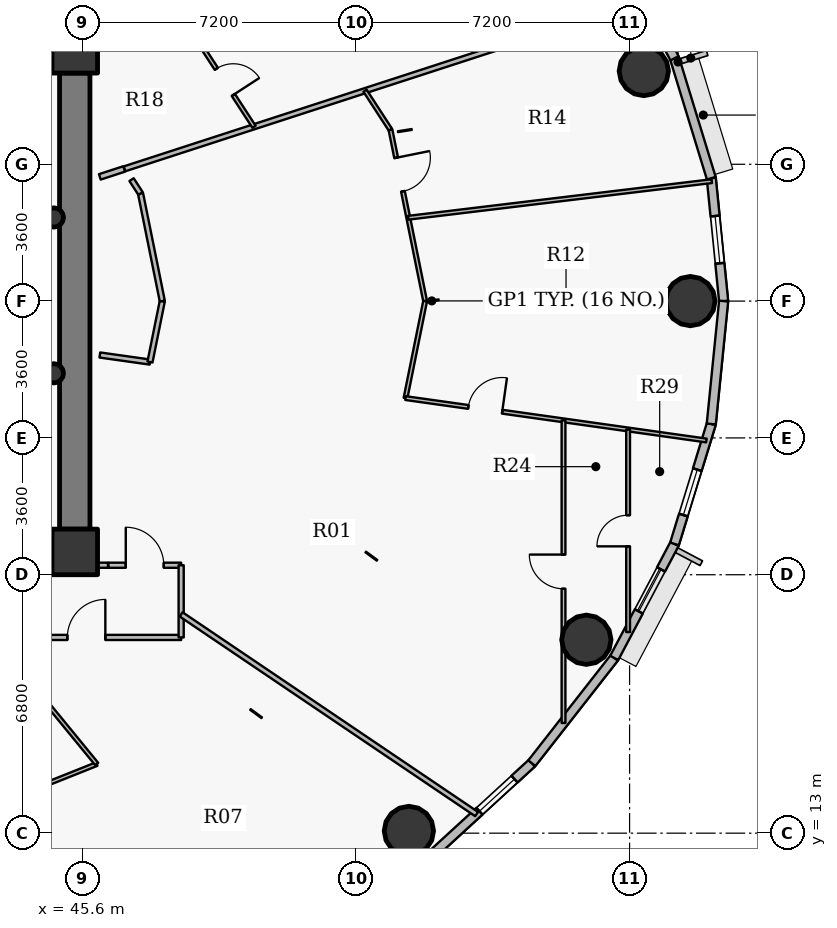
"""IFC4 building model, lengths in metres.
Left out: names, types, materials, properties, quantities, classifications, styles, units other than length and angle.
Written with IfcOpenShell. Run it as: python <this file> out.ifc"""

import sys

from ifc_helpers import new_model, si_unit, direction, frame, frame_2d, origin, origin_2d, place, context, subcontext, project, spatial, rectangle, hollow_circle, extrude, source, transform, mapped, element, fill, save


model = new_model("IFC4")
c1 = context("Model", 3, precision=1e-05, world=origin(), true_north=direction((0.0, 1.0)))
c2 = subcontext(c1, "Body", "Model", "MODEL_VIEW")
j1 = project(units=[si_unit("LENGTHUNIT", "METRE"), si_unit("PLANEANGLEUNIT", "RADIAN")], contexts=[c1])
p1 = place(None, origin())
s1 = spatial("IfcSite", under=j1, at=p1, CompositionType="ELEMENT")
p2 = place(p1, origin())
s2 = spatial("IfcBuilding", under=s1, at=p2, CompositionType="ELEMENT")
p3 = place(p2, frame((0.0, 0.0, 156.15)))
s3 = spatial("IfcBuildingStorey", under=s2, at=p3, CompositionType="ELEMENT", Elevation=156.15)
for number, where, z_axis, x_axis in (
    (1, (45.4, 20.4, 0.0), (0.0, 0.0, 1.0), (1.0, 0.0, 0.0)),
    (2, (45.4, 33.6, 0.0), (0.0, 0.0, 1.0), (1.0, 0.0, 0.0)),
):
    element("IfcColumn", number, at=place(p3, frame(where, z_axis=z_axis, x_axis=x_axis)), inside=s3, PredefinedType="COLUMN", context=c2, shape_type="SweptSolid", body=[
        extrude(rectangle(XDim=1.2, YDim=1.2, at=origin_2d()), origin(), (0.0, 0.0, 1.0), 3.75),
    ])
p4 = place(p3, frame((45.4, 33.0, 0.0), z_axis=(0.0, 0.0, 1.0), x_axis=(0.0, -1.0, 0.0)))
e3 = element("IfcWall", 3, at=p4, inside=s3, PredefinedType="SHEAR", context=c2, shape_type="SweptSolid", body=[
    extrude(rectangle(XDim=12.0, YDim=0.8, at=frame_2d((6.0, 0.0))), origin(), (0.0, 0.0, 1.0), 2.95),
])
for number, where, z_axis, x_axis in (
    (4, (61.6, 27.0, 0.0), (0.0, 0.0, 1.0), (1.0, 0.0, 0.0)),
    (5, (60.375, 33.053, 0.0), (0.0, 0.0, 1.0), (1.0, 0.0, 0.0)),
    (6, (54.192, 13.058, 0.0), (0.0, 0.0, 1.0), (1.0, 0.0, 0.0)),
    (7, (58.863, 18.089, 0.0), (0.0, 0.0, 1.0), (1.0, 0.0, 0.0)),
):
    element("IfcColumn", number, at=place(p3, frame(where, z_axis=z_axis, x_axis=x_axis)), inside=s3, PredefinedType="COLUMN", context=c2, shape_type="SweptSolid", body=[
        extrude(hollow_circle(Radius=0.65, WallThickness=0.04, at=origin_2d()), origin(), (0.0, 0.0, 1.0), 3.75),
    ])
for number, where, z_axis, x_axis in (
    (8, (44.85, 25.1, 0.0), (0.0, 0.0, 1.0), (1.0, 0.0, 0.0)),
    (9, (44.85, 29.2, 0.0), (0.0, 0.0, 1.0), (1.0, 0.0, 0.0)),
):
    element("IfcColumn", number, at=place(p3, frame(where, z_axis=z_axis, x_axis=x_axis)), inside=s3, PredefinedType="COLUMN", context=c2, shape_type="SweptSolid", body=[
        extrude(hollow_circle(Radius=0.254, WallThickness=0.02, at=origin_2d()), origin(), (0.0, 0.0, 1.0), 3.75),
    ])
p5 = place(p3, frame((62.15, 30.234, 0.0), z_axis=(0.0, 0.0, 1.0), x_axis=(0.100061534614, -0.994981250723, 0.0)))
e10 = element("IfcWall", 10, at=p5, inside=s3, PredefinedType="SOLIDWALL", context=c2, shape_type="SweptSolid", body=[
    extrude(rectangle(XDim=3.25, YDim=0.24, at=frame_2d((1.625, 0.0))), origin(), (0.0, 0.0, 1.0), 3.5),
])
p6 = place(p5, frame((1.0, 0.0, 0.9)))
e11 = element("IfcOpeningElement", 11, at=p6, cuts=e10, PredefinedType="OPENING", context=c2, shape_type="SweptSolid", body=[
    extrude(rectangle(XDim=1.25, YDim=1.65, at=origin_2d()), frame((0.625, 0.13, 0.825), z_axis=(0.0, -1.0, 0.0), x_axis=(1.0, 0.0, 0.0)), (0.0, 0.0, 1.0), 0.26),
])
p7 = place(p3, frame((61.183, 33.389, 0.0), z_axis=(0.0, 0.0, 1.0), x_axis=(0.293097995113, -0.956082405058, 0.0)))
e12 = element("IfcWall", 12, at=p7, inside=s3, PredefinedType="SOLIDWALL", context=c2, shape_type="SweptSolid", body=[
    extrude(rectangle(XDim=3.3, YDim=0.24, at=frame_2d((1.65, 0.0))), origin(), (0.0, 0.0, 1.0), 3.5),
])
p8 = place(p3, frame((59.596, 36.388, 0.0), z_axis=(0.0, 0.0, 1.0), x_axis=(0.467586874938, -0.88394712194, 0.0)))
e13 = element("IfcWall", 13, at=p8, inside=s3, PredefinedType="SOLIDWALL", context=c2, shape_type="SweptSolid", body=[
    extrude(rectangle(XDim=3.393, YDim=0.24, at=frame_2d((1.697, 0.0))), origin(), (0.0, 0.0, 1.0), 3.5),
])
p9 = place(p3, frame((57.428, 14.842, 0.0), z_axis=(0.0, 0.0, 1.0), x_axis=(-0.737076565834, -0.675809245349, 0.0)))
e14 = element("IfcWall", 14, at=p9, inside=s3, PredefinedType="SOLIDWALL", context=c2, shape_type="SweptSolid", body=[
    extrude(rectangle(XDim=3.658, YDim=0.24, at=frame_2d((1.829, 0.0))), origin(), (0.0, 0.0, 1.0), 3.5),
])
p10 = place(p9, frame((0.621, 0.0, 0.9)))
e15 = element("IfcOpeningElement", 15, at=p10, cuts=e14, PredefinedType="OPENING", context=c2, shape_type="SweptSolid", body=[
    extrude(rectangle(XDim=1.25, YDim=1.65, at=origin_2d()), frame((0.625, 0.13, 0.825), z_axis=(0.0, -1.0, 0.0), x_axis=(1.0, 0.0, 0.0)), (0.0, 0.0, 1.0), 0.26),
])
p11 = place(p3, frame((59.596, 17.612, 0.0), z_axis=(0.0, 0.0, 1.0), x_axis=(-0.616287674549, -0.787521112224, 0.0)))
e16 = element("IfcWall", 16, at=p11, inside=s3, PredefinedType="SOLIDWALL", context=c2, shape_type="SweptSolid", body=[
    extrude(rectangle(XDim=3.517, YDim=0.24, at=frame_2d((1.759, 0.0))), origin(), (0.0, 0.0, 1.0), 3.5),
])
p12 = place(p3, frame((61.183, 20.611, 0.0), z_axis=(0.0, 0.0, 1.0), x_axis=(-0.467586874938, -0.88394712194, 0.0)))
e17 = element("IfcWall", 17, at=p12, inside=s3, PredefinedType="SOLIDWALL", context=c2, shape_type="SweptSolid", body=[
    extrude(rectangle(XDim=3.393, YDim=0.24, at=frame_2d((1.697, 0.0))), origin(), (0.0, 0.0, 1.0), 3.5),
])
p13 = place(p12, frame((0.759, 0.0, 0.9)))
e18 = element("IfcOpeningElement", 18, at=p13, cuts=e17, PredefinedType="OPENING", context=c2, shape_type="SweptSolid", body=[
    extrude(rectangle(XDim=1.25, YDim=1.65, at=origin_2d()), frame((0.625, 0.13, 0.825), z_axis=(0.0, -1.0, 0.0), x_axis=(1.0, 0.0, 0.0)), (0.0, 0.0, 1.0), 0.26),
])
p14 = place(p3, frame((62.15, 23.766, 0.0), z_axis=(0.0, 0.0, 1.0), x_axis=(-0.293097995113, -0.956082405058, 0.0)))
e19 = element("IfcWall", 19, at=p14, inside=s3, PredefinedType="SOLIDWALL", context=c2, shape_type="SweptSolid", body=[
    extrude(rectangle(XDim=3.3, YDim=0.24, at=frame_2d((1.65, 0.0))), origin(), (0.0, 0.0, 1.0), 3.5),
])
p15 = place(p14, frame((1.256, 0.0, 0.9)))
e20 = element("IfcOpeningElement", 20, at=p15, cuts=e19, PredefinedType="OPENING", context=c2, shape_type="SweptSolid", body=[
    extrude(rectangle(XDim=1.25, YDim=1.65, at=origin_2d()), frame((0.625, 0.13, 0.825), z_axis=(0.0, -1.0, 0.0), x_axis=(1.0, 0.0, 0.0)), (0.0, 0.0, 1.0), 0.26),
])
p16 = place(p3, frame((62.475, 27.0, 0.0), z_axis=(0.0, 0.0, 1.0), x_axis=(-0.100061534614, -0.994981250723, 0.0)))
e21 = element("IfcWall", 21, at=p16, inside=s3, PredefinedType="SOLIDWALL", context=c2, shape_type="SweptSolid", body=[
    extrude(rectangle(XDim=3.25, YDim=0.24, at=frame_2d((1.625, 0.0))), origin(), (0.0, 0.0, 1.0), 3.5),
])
p17 = place(p3, frame((35.486, 18.15, 0.0), z_axis=(0.0, 0.0, 1.0), x_axis=(1.0, 0.0, 0.0)))
e22 = element("IfcWall", 22, at=p17, inside=s3, PredefinedType="PARTITIONING", context=c2, shape_type="SweptSolid", body=[
    extrude(rectangle(XDim=12.714, YDim=0.135, at=frame_2d((6.357, 0.0))), origin(), (0.0, 0.0, 1.0), 2.935),
])
p18 = place(p17, frame((1.628, 0.0, 0.0)))
e23 = element("IfcOpeningElement", 23, at=p18, cuts=e22, PredefinedType="OPENING", context=c2, shape_type="SweptSolid", body=[
    extrude(rectangle(XDim=1.0, YDim=2.15, at=origin_2d()), frame((0.5, 0.078, 1.075), z_axis=(0.0, -1.0, 0.0), x_axis=(1.0, 0.0, 0.0)), (0.0, 0.0, 1.0), 0.155),
])
p19 = place(p17, frame((9.719, 0.0, 0.0)))
e24 = element("IfcOpeningElement", 24, at=p19, cuts=e22, PredefinedType="OPENING", context=c2, shape_type="SweptSolid", body=[
    extrude(rectangle(XDim=1.0, YDim=2.15, at=origin_2d()), frame((0.5, 0.078, 1.075), z_axis=(0.0, -1.0, 0.0), x_axis=(1.0, 0.0, 0.0)), (0.0, 0.0, 1.0), 0.155),
])
p20 = place(p3, frame((41.794, 13.149, 0.0), z_axis=(0.0, 0.0, 1.0), x_axis=(0.928797683311, 0.370587187415, 0.0)))
e25 = element("IfcWall", 25, at=p20, inside=s3, PredefinedType="PARTITIONING", context=c2, shape_type="SweptSolid", body=[
    extrude(rectangle(XDim=4.506, YDim=0.1, at=frame_2d((2.253, 0.0))), origin(), (0.0, 0.0, 1.0), 2.935),
])
p21 = place(p20, frame((1.803, 0.0, 0.0)))
e26 = element("IfcOpeningElement", 26, at=p21, cuts=e25, PredefinedType="OPENING", context=c2, shape_type="SweptSolid", body=[
    extrude(rectangle(XDim=0.9, YDim=2.1, at=origin_2d()), frame((0.45, 0.06, 1.05), z_axis=(0.0, -1.0, 0.0), x_axis=(1.0, 0.0, 0.0)), (0.0, 0.0, 1.0), 0.12),
])
p22 = place(p3, frame((43.25, 18.15, 0.0), z_axis=(0.0, 0.0, 1.0), x_axis=(0.633743940899, -0.773542899505, 0.0)))
e27 = element("IfcWall", 27, at=p22, inside=s3, PredefinedType="PARTITIONING", context=c2, shape_type="SweptSolid", body=[
    extrude(rectangle(XDim=4.307, YDim=0.1, at=frame_2d((2.153, 0.0))), origin(), (0.0, 0.0, 1.0), 3.5),
])
p23 = place(p22, frame((0.414, 0.0, 0.0)))
e28 = element("IfcOpeningElement", 28, at=p23, cuts=e27, PredefinedType="OPENING", context=c2, shape_type="SweptSolid", body=[
    extrude(rectangle(XDim=0.82, YDim=2.1, at=origin_2d()), frame((0.41, 0.06, 1.05), z_axis=(0.0, -1.0, 0.0), x_axis=(1.0, 0.0, 0.0)), (0.0, 0.0, 1.0), 0.12),
])
p24 = place(p3, frame((46.285, 20.05, 0.0), z_axis=(0.0, 0.0, 1.0), x_axis=(1.0, 0.0, 0.0)))
e29 = element("IfcWall", 29, at=p24, inside=s3, PredefinedType="PARTITIONING", context=c2, shape_type="SweptSolid", body=[
    extrude(rectangle(XDim=1.915, YDim=0.135, at=frame_2d((0.958, 0.0))), origin(), (0.0, 0.0, 1.0), 3.5),
])
p25 = place(p24, frame((0.458, 0.0, 0.0)))
e30 = element("IfcOpeningElement", 30, at=p25, cuts=e29, PredefinedType="OPENING", context=c2, shape_type="SweptSolid", body=[
    extrude(rectangle(XDim=1.0, YDim=2.15, at=origin_2d()), frame((0.5, 0.078, 1.075), z_axis=(0.0, -1.0, 0.0), x_axis=(1.0, 0.0, 0.0)), (0.0, 0.0, 1.0), 0.155),
])
p26 = place(p3, frame((46.71, 30.48, 0.0), z_axis=(0.0, 0.0, 1.0), x_axis=(0.951054665008, 0.309022691992, 0.0)))
e31 = element("IfcWall", 31, at=p26, inside=s3, PredefinedType="PARTITIONING", context=c2, shape_type="SweptSolid", body=[
    extrude(rectangle(XDim=14.372, YDim=0.135, at=frame_2d((7.186, 0.0))), origin(), (0.0, 0.0, 1.0), 2.935),
])
p27 = place(p3, frame((48.2, 18.15, 0.0), z_axis=(0.0, 0.0, 1.0), x_axis=(0.0, 1.0, 0.0)))
e32 = element("IfcWall", 32, at=p27, inside=s3, PredefinedType="PARTITIONING", context=c2, shape_type="SweptSolid", body=[
    extrude(rectangle(XDim=1.9, YDim=0.135, at=frame_2d((0.95, 0.0))), origin(), (0.0, 0.0, 1.0), 3.5),
])
p28 = place(p3, frame((48.2, 18.756, 0.0), z_axis=(0.0, 0.0, 1.0), x_axis=(0.828559609568, -0.559900860325, 0.0)))
e33 = element("IfcWall", 33, at=p28, inside=s3, PredefinedType="PARTITIONING", context=c2, shape_type="SweptSolid", body=[
    extrude(rectangle(XDim=9.384, YDim=0.135, at=frame_2d((4.692, 0.0))), origin(), (0.0, 0.0, 1.0), 2.935),
])
p29 = place(p3, frame((48.58, 33.95, 0.0), z_axis=(0.0, 0.0, 1.0), x_axis=(0.545393120499, -0.838180376836, 0.0)))
e34 = element("IfcWall", 34, at=p29, inside=s3, PredefinedType="PARTITIONING", context=c2, shape_type="SweptSolid", body=[
    extrude(rectangle(XDim=2.819, YDim=0.1, at=frame_2d((1.41, 0.0))), origin(), (0.0, 0.0, 1.0), 3.5),
])
p30 = place(p29, frame((1.0, 0.0, 0.0)))
e35 = element("IfcOpeningElement", 35, at=p30, cuts=e34, PredefinedType="OPENING", context=c2, shape_type="SweptSolid", body=[
    extrude(rectangle(XDim=0.82, YDim=2.1, at=origin_2d()), frame((0.41, 0.06, 1.05), z_axis=(0.0, -1.0, 0.0), x_axis=(1.0, 0.0, 0.0)), (0.0, 0.0, 1.0), 0.12),
])
p31 = place(p3, frame((53.038, 32.536, 0.0), z_axis=(0.0, 0.0, 1.0), x_axis=(0.545407162254, -0.83817123988, 0.0)))
e36 = element("IfcWall", 36, at=p31, inside=s3, PredefinedType="PARTITIONING", context=c2, shape_type="SweptSolid", body=[
    extrude(rectangle(XDim=1.229, YDim=0.1, at=frame_2d((0.615, 0.0))), origin(), (0.0, 0.0, 1.0), 2.935),
])
p32 = place(p3, frame((53.709, 31.506, 0.0), z_axis=(0.0, 0.0, 1.0), x_axis=(0.198209478932, -0.980159682124, 0.0)))
e37 = element("IfcWall", 37, at=p32, inside=s3, PredefinedType="PARTITIONING", context=c2, shape_type="SweptSolid", body=[
    extrude(rectangle(XDim=4.597, YDim=0.1, at=frame_2d((2.298, 0.0))), origin(), (0.0, 0.0, 1.0), 2.935),
])
p33 = place(p32, frame((0.75, 0.0, 0.0)))
e38 = element("IfcOpeningElement", 38, at=p33, cuts=e37, PredefinedType="OPENING", context=c2, shape_type="SweptSolid", body=[
    extrude(rectangle(XDim=0.9, YDim=2.1, at=origin_2d()), frame((0.45, 0.06, 1.05), z_axis=(0.0, -1.0, 0.0), x_axis=(1.0, 0.0, 0.0)), (0.0, 0.0, 1.0), 0.12),
])
p34 = place(p3, frame((54.104, 24.448, 0.0), z_axis=(0.0, 0.0, 1.0), x_axis=(0.198315541218, 0.980138228063, 0.0)))
e39 = element("IfcWall", 39, at=p34, inside=s3, PredefinedType="PARTITIONING", context=c2, shape_type="SweptSolid", body=[
    extrude(rectangle(XDim=2.604, YDim=0.1, at=frame_2d((1.302, 0.0))), origin(), (0.0, 0.0, 1.0), 2.935),
])
p35 = place(p3, frame((54.104, 24.448, 0.0), z_axis=(0.0, 0.0, 1.0), x_axis=(0.990209750791, -0.139587425789, 0.0)))
e40 = element("IfcWall", 40, at=p35, inside=s3, PredefinedType="PARTITIONING", context=c2, shape_type="SweptSolid", body=[
    extrude(rectangle(XDim=7.997, YDim=0.1, at=frame_2d((3.998, 0.0))), origin(), (0.0, 0.0, 1.0), 2.935),
])
p36 = place(p35, frame((1.67, 0.0, 0.0)))
e41 = element("IfcOpeningElement", 41, at=p36, cuts=e40, PredefinedType="OPENING", context=c2, shape_type="SweptSolid", body=[
    extrude(rectangle(XDim=0.9, YDim=2.1, at=origin_2d()), frame((0.45, 0.06, 1.05), z_axis=(0.0, -1.0, 0.0), x_axis=(1.0, 0.0, 0.0)), (0.0, 0.0, 1.0), 0.12),
])
p37 = place(p3, frame((54.177, 29.193, 0.0), z_axis=(0.0, 0.0, 1.0), x_axis=(0.992799222866, 0.119790246168, 0.0)))
e42 = element("IfcWall", 42, at=p37, inside=s3, PredefinedType="PARTITIONING", context=c2, shape_type="SweptSolid", body=[
    extrude(rectangle(XDim=8.044, YDim=0.1, at=frame_2d((4.022, 0.0))), origin(), (0.0, 0.0, 1.0), 2.935),
])
p38 = place(p3, frame((58.262, 15.899, 0.0), z_axis=(0.0, 0.0, 1.0), x_axis=(0.0, 1.0, 0.0)))
e43 = element("IfcWall", 43, at=p38, inside=s3, PredefinedType="PARTITIONING", context=c2, shape_type="SweptSolid", body=[
    extrude(rectangle(XDim=7.963, YDim=0.1, at=frame_2d((3.981, 0.0))), origin(), (0.0, 0.0, 1.0), 2.935),
])
p39 = place(p38, frame((3.531, 0.0, 0.0)))
e44 = element("IfcOpeningElement", 44, at=p39, cuts=e43, PredefinedType="OPENING", context=c2, shape_type="SweptSolid", body=[
    extrude(rectangle(XDim=0.9, YDim=2.1, at=origin_2d()), frame((0.45, 0.06, 1.05), z_axis=(0.0, -1.0, 0.0), x_axis=(1.0, 0.0, 0.0)), (0.0, 0.0, 1.0), 0.12),
])
p40 = place(p3, frame((59.961, 18.291, 0.0), z_axis=(0.0, 0.0, 1.0), x_axis=(0.0, 1.0, 0.0)))
e45 = element("IfcWall", 45, at=p40, inside=s3, PredefinedType="PARTITIONING", context=c2, shape_type="SweptSolid", body=[
    extrude(rectangle(XDim=5.331, YDim=0.1, at=frame_2d((2.666, 0.0))), origin(), (0.0, 0.0, 1.0), 2.935),
])
p41 = place(p40, frame((2.256, 0.0, 0.0)))
e46 = element("IfcOpeningElement", 46, at=p41, cuts=e45, PredefinedType="OPENING", context=c2, shape_type="SweptSolid", body=[
    extrude(rectangle(XDim=0.82, YDim=2.1, at=origin_2d()), frame((0.41, 0.06, 1.05), z_axis=(0.0, -1.0, 0.0), x_axis=(1.0, 0.0, 0.0)), (0.0, 0.0, 1.0), 0.12),
])
p42 = place(p3, frame((44.81, 20.0, 0.0), z_axis=(0.0, 0.0, 1.0), x_axis=(1.0, 0.0, 0.0)))
e47 = element("IfcWall", 47, at=p42, inside=s3, PredefinedType="PARTITIONING", context=c2, shape_type="SweptSolid", body=[
    extrude(rectangle(XDim=0.99, YDim=0.135, at=frame_2d((0.495, 0.0))), origin(), (0.0, 0.0, 1.0), 2.935),
])
p43 = place(p3, frame((45.81, 20.05, 0.0), z_axis=(0.0, 0.0, 1.0), x_axis=(1.0, 0.0, 0.0)))
e48 = element("IfcWall", 48, at=p43, inside=s3, PredefinedType="PARTITIONING", context=c2, shape_type="SweptSolid", body=[
    extrude(rectangle(XDim=0.465, YDim=0.135, at=frame_2d((0.232, 0.0))), origin(), (0.0, 0.0, 1.0), 3.5),
])
p44 = place(p3, frame((45.8, 33.01, 0.0), z_axis=(0.0, 0.0, 1.0), x_axis=(0.0, 1.0, 0.0)))
e49 = element("IfcWall", 49, at=p44, inside=s3, PredefinedType="PARTITIONING", context=c2, shape_type="SweptSolid", body=[
    extrude(rectangle(XDim=0.682, YDim=0.15, at=frame_2d((0.341, 0.0))), origin(), (0.0, 0.0, 1.0), 3.185),
])
p45 = place(p3, frame((46.7, 30.477, 0.0), z_axis=(0.0, 0.0, 1.0), x_axis=(-0.951050060735, -0.309036861841, 0.0)))
e50 = element("IfcWall", 50, at=p45, inside=s3, PredefinedType="PARTITIONING", context=c2, shape_type="SweptSolid", body=[
    extrude(rectangle(XDim=0.673, YDim=0.15, at=frame_2d((0.336, 0.0))), origin(), (0.0, 0.0, 1.0), 3.5),
])
p46 = place(p3, frame((45.8, 20.378, 0.0), z_axis=(0.0, 0.0, 1.0), x_axis=(0.0, 1.0, 0.0)))
e51 = element("IfcWall", 51, at=p46, inside=s3, PredefinedType="PARTITIONING", context=c2, shape_type="SweptSolid", body=[
    extrude(rectangle(XDim=0.612, YDim=0.135, at=frame_2d((0.306, 0.0))), origin(), (0.0, 0.0, 1.0), 3.5),
])
p47 = place(p3, frame((46.06, 25.582, 0.0), z_axis=(0.0, 0.0, 1.0), x_axis=(0.990207965895, -0.139600086959, 0.0)))
e52 = element("IfcWall", 52, at=p47, inside=s3, PredefinedType="PARTITIONING", context=c2, shape_type="SweptSolid", body=[
    extrude(rectangle(XDim=1.333, YDim=0.135, at=frame_2d((0.666, 0.0))), origin(), (0.0, 0.0, 1.0), 3.5),
])
p48 = place(p3, frame((47.38, 25.396, 0.0), z_axis=(0.0, 0.0, 1.0), x_axis=(0.19826737525, 0.980147972457, 0.0)))
e53 = element("IfcWall", 53, at=p48, inside=s3, PredefinedType="PARTITIONING", context=c2, shape_type="SweptSolid", body=[
    extrude(rectangle(XDim=1.636, YDim=0.135, at=frame_2d((0.818, 0.0))), origin(), (0.0, 0.0, 1.0), 2.935),
])
p49 = place(p3, frame((47.704, 27.0, 0.0), z_axis=(0.0, 0.0, 1.0), x_axis=(-0.198292837027, 0.980142821625, 0.0)))
e54 = element("IfcWall", 54, at=p49, inside=s3, PredefinedType="PARTITIONING", context=c2, shape_type="SweptSolid", body=[
    extrude(rectangle(XDim=2.89, YDim=0.135, at=frame_2d((1.445, 0.0))), origin(), (0.0, 0.0, 1.0), 2.935),
])
p50 = place(p3, frame((47.131, 29.832, 0.0), z_axis=(0.0, 0.0, 1.0), x_axis=(-0.545305123916, 0.838237628499, 0.0)))
e55 = element("IfcWall", 55, at=p50, inside=s3, PredefinedType="PARTITIONING", context=c2, shape_type="SweptSolid", body=[
    extrude(rectangle(XDim=0.433, YDim=0.135, at=frame_2d((0.217, 0.0))), origin(), (0.0, 0.0, 1.0), 2.935),
])
m1 = source(origin(), c2, "Body", "SweptSolid", [
    extrude(rectangle(XDim=1.25, YDim=1.65, at=origin_2d()), frame((0.625, 0.03, 0.825), z_axis=(0.0, -1.0, 0.0), x_axis=(1.0, 0.0, 0.0)), (0.0, 0.0, 1.0), 0.06),
])
p51 = place(p13, origin())
e56 = element("IfcWindow", 56, at=p51, inside=s3, PartitioningType="SINGLE_PANEL", PredefinedType="WINDOW", context=c2, shape_type="MappedRepresentation", body=[
    mapped(m1, transform((0.0, 0.0, 0.0), x_axis=(1.0, 0.0, 0.0), y_axis=(0.0, 1.0, 0.0), z_axis=(0.0, 0.0, 1.0), scale=1.0)),
])
fill(e18, e56)
p52 = place(p15, origin())
e57 = element("IfcWindow", 57, at=p52, inside=s3, PartitioningType="SINGLE_PANEL", PredefinedType="WINDOW", context=c2, shape_type="MappedRepresentation", body=[
    mapped(m1, transform((0.0, 0.0, 0.0), x_axis=(1.0, 0.0, 0.0), y_axis=(0.0, 1.0, 0.0), z_axis=(0.0, 0.0, 1.0), scale=1.0)),
])
fill(e20, e57)
p53 = place(p10, origin())
e58 = element("IfcWindow", 58, at=p53, inside=s3, PartitioningType="SINGLE_PANEL", PredefinedType="WINDOW", context=c2, shape_type="MappedRepresentation", body=[
    mapped(m1, transform((0.0, 0.0, 0.0), x_axis=(1.0, 0.0, 0.0), y_axis=(0.0, 1.0, 0.0), z_axis=(0.0, 0.0, 1.0), scale=1.0)),
])
fill(e15, e58)
p54 = place(p6, origin())
e59 = element("IfcWindow", 59, at=p54, inside=s3, PartitioningType="SINGLE_PANEL", PredefinedType="WINDOW", context=c2, shape_type="MappedRepresentation", body=[
    mapped(m1, transform((0.0, 0.0, 0.0), x_axis=(1.0, 0.0, 0.0), y_axis=(0.0, 1.0, 0.0), z_axis=(0.0, 0.0, 1.0), scale=1.0)),
])
fill(e11, e59)
m2 = source(origin(), c2, "Body", "SweptSolid", [
    extrude(rectangle(XDim=0.82, YDim=2.1, at=origin_2d()), frame((0.41, 0.025, 1.05), z_axis=(0.0, -1.0, 0.0), x_axis=(1.0, 0.0, 0.0)), (0.0, 0.0, 1.0), 0.05),
])
p55 = place(p30, origin())
e60 = element("IfcDoor", 60, at=p55, inside=s3, OperationType="SINGLE_SWING_RIGHT", PredefinedType="DOOR", context=c2, shape_type="MappedRepresentation", body=[
    mapped(m2, transform((0.0, 0.0, 0.0), x_axis=(1.0, 0.0, 0.0), y_axis=(0.0, 1.0, 0.0), z_axis=(0.0, 0.0, 1.0), scale=1.0)),
])
fill(e35, e60)
m3 = source(origin(), c2, "Body", "SweptSolid", [
    extrude(rectangle(XDim=1.0, YDim=2.15, at=origin_2d()), frame((0.5, 0.025, 1.075), z_axis=(0.0, -1.0, 0.0), x_axis=(1.0, 0.0, 0.0)), (0.0, 0.0, 1.0), 0.05),
])
p56 = place(p19, origin())
e61 = element("IfcDoor", 61, at=p56, inside=s3, OperationType="SINGLE_SWING_RIGHT", PredefinedType="DOOR", context=c2, shape_type="MappedRepresentation", body=[
    mapped(m3, transform((0.0, 0.0, 0.0), x_axis=(1.0, 0.0, 0.0), y_axis=(0.0, 1.0, 0.0), z_axis=(0.0, 0.0, 1.0), scale=1.0)),
])
fill(e24, e61)
p57 = place(p25, origin())
e62 = element("IfcDoor", 62, at=p57, inside=s3, OperationType="SINGLE_SWING_LEFT", PredefinedType="DOOR", context=c2, shape_type="MappedRepresentation", body=[
    mapped(m3, transform((0.0, 0.0, 0.0), x_axis=(1.0, 0.0, 0.0), y_axis=(0.0, 1.0, 0.0), z_axis=(0.0, 0.0, 1.0), scale=1.0)),
])
fill(e30, e62)
m4 = source(origin(), c2, "Body", "SweptSolid", [
    extrude(rectangle(XDim=0.9, YDim=2.1, at=origin_2d()), frame((0.45, 0.025, 1.05), z_axis=(0.0, -1.0, 0.0), x_axis=(1.0, 0.0, 0.0)), (0.0, 0.0, 1.0), 0.05),
])
p58 = place(p36, origin())
e63 = element("IfcDoor", 63, at=p58, inside=s3, OperationType="SINGLE_SWING_RIGHT", PredefinedType="DOOR", context=c2, shape_type="MappedRepresentation", body=[
    mapped(m4, transform((0.0, 0.0, 0.0), x_axis=(1.0, 0.0, 0.0), y_axis=(0.0, 1.0, 0.0), z_axis=(0.0, 0.0, 1.0), scale=1.0)),
])
fill(e41, e63)
p59 = place(p33, origin())
e64 = element("IfcDoor", 64, at=p59, inside=s3, OperationType="SINGLE_SWING_LEFT", PredefinedType="DOOR", context=c2, shape_type="MappedRepresentation", body=[
    mapped(m4, transform((0.0, 0.0, 0.0), x_axis=(1.0, 0.0, 0.0), y_axis=(0.0, 1.0, 0.0), z_axis=(0.0, 0.0, 1.0), scale=1.0)),
])
fill(e38, e64)
p60 = place(p39, origin())
e65 = element("IfcDoor", 65, at=p60, inside=s3, OperationType="SINGLE_SWING_RIGHT", PredefinedType="DOOR", context=c2, shape_type="MappedRepresentation", body=[
    mapped(m4, transform((0.0, 0.0, 0.0), x_axis=(1.0, 0.0, 0.0), y_axis=(0.0, 1.0, 0.0), z_axis=(0.0, 0.0, 1.0), scale=1.0)),
])
fill(e44, e65)
p61 = place(p41, origin())
e66 = element("IfcDoor", 66, at=p61, inside=s3, OperationType="SINGLE_SWING_LEFT", PredefinedType="DOOR", context=c2, shape_type="MappedRepresentation", body=[
    mapped(m2, transform((0.0, 0.0, 0.0), x_axis=(1.0, 0.0, 0.0), y_axis=(0.0, 1.0, 0.0), z_axis=(0.0, 0.0, 1.0), scale=1.0)),
])
fill(e46, e66)
save(model, sys.argv[1])
